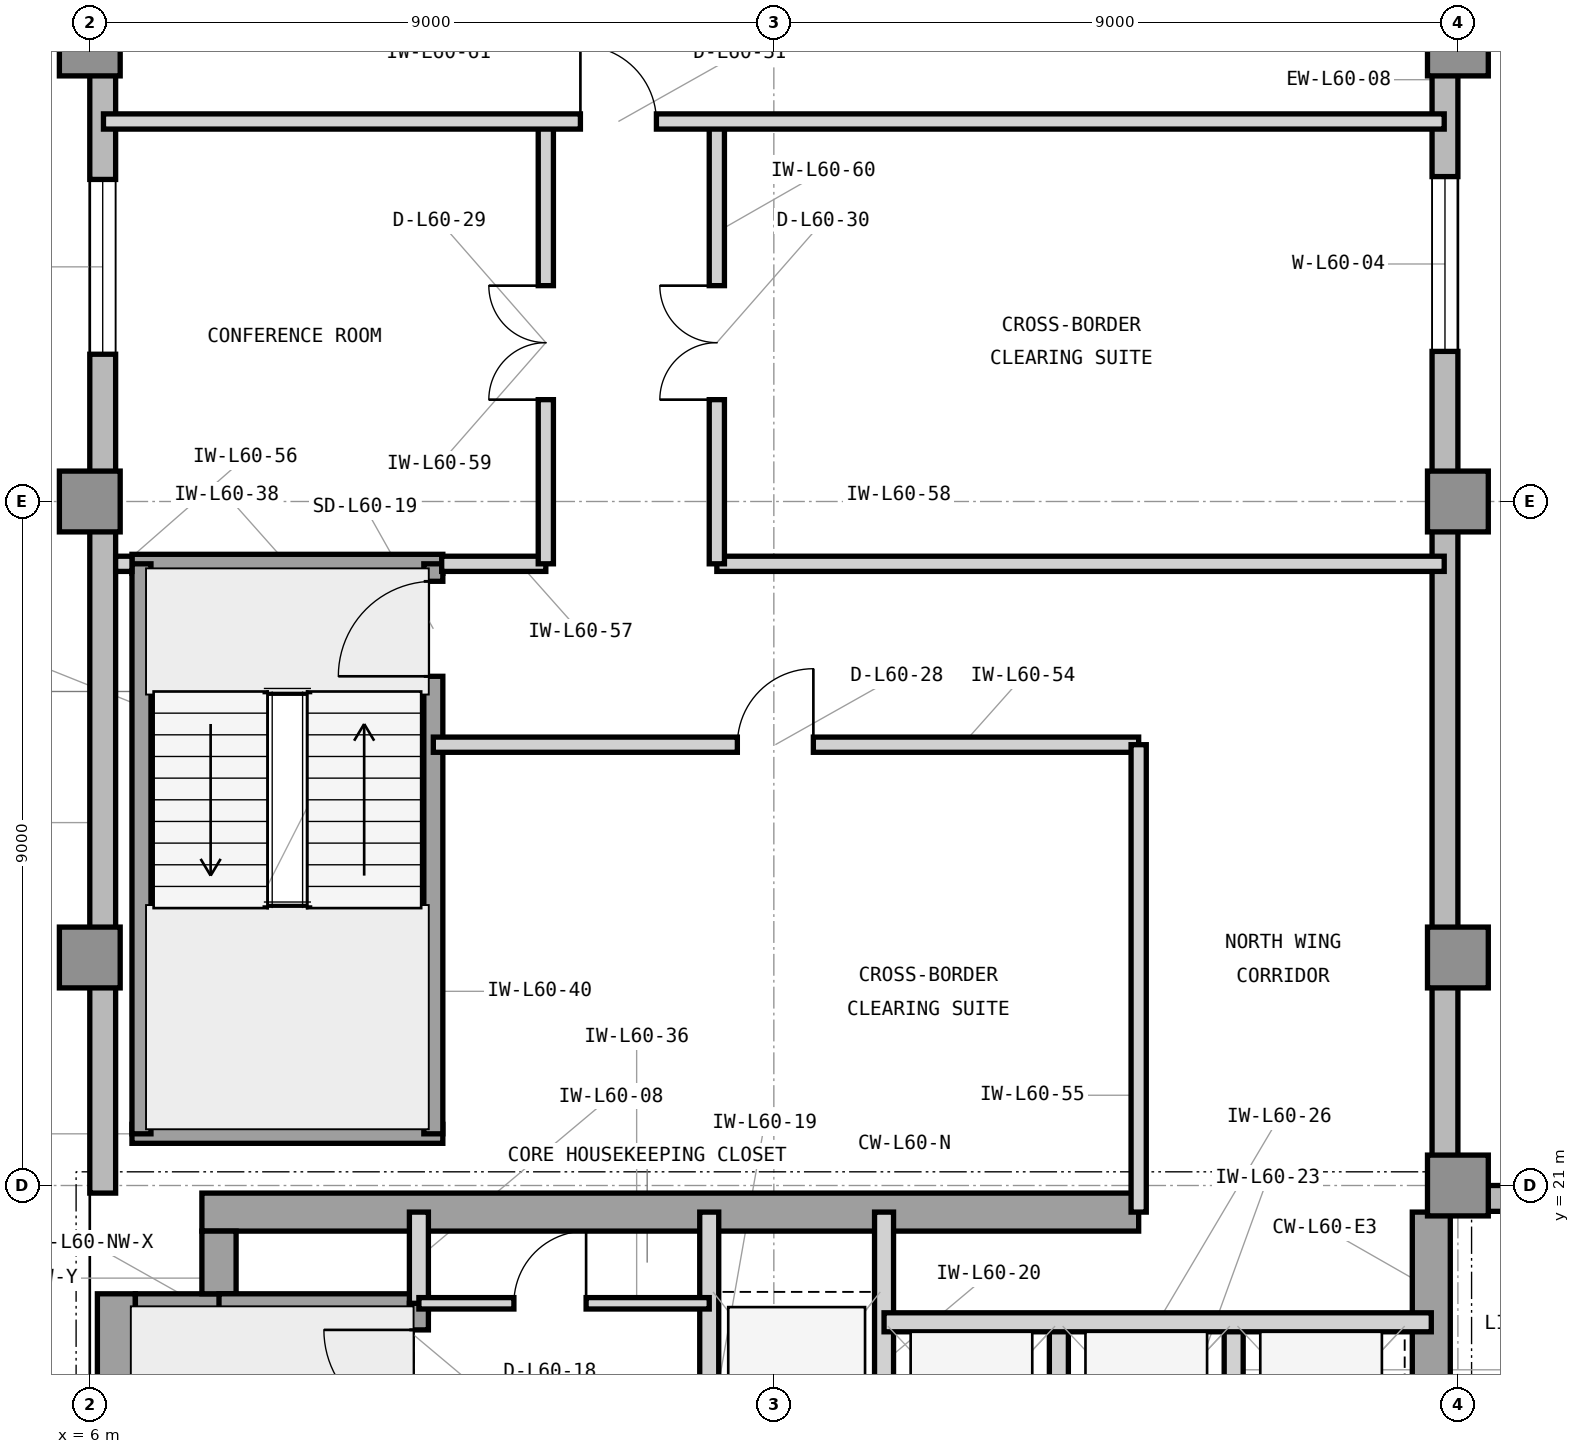
"""IFC4 building model, lengths in metres.
Left out: names, types, materials, properties, quantities, classifications, styles, units other than length and angle.
Written with IfcOpenShell. Run it as: python <this file> out.ifc"""

import sys

from ifc_helpers import new_model, si_unit, direction, frame, frame_2d, origin, origin_2d, place, context, subcontext, project, spatial, rectangle, extrude, element, fill, save


model = new_model("IFC4")
c1 = context("Model", 3, precision=1e-05, world=origin(), true_north=direction((0.0, 1.0)))
c2 = subcontext(c1, "Body", "Model", "MODEL_VIEW")
j1 = project(units=[si_unit("LENGTHUNIT", "METRE"), si_unit("PLANEANGLEUNIT", "RADIAN")], contexts=[c1])
p1 = place(None, origin())
s1 = spatial("IfcSite", under=j1, at=p1, CompositionType="ELEMENT")
p2 = place(p1, origin())
s2 = spatial("IfcBuilding", under=s1, at=p2, CompositionType="ELEMENT")
p3 = place(p2, frame((0.0, 0.0, 246.9)))
s3 = spatial("IfcBuildingStorey", under=s2, at=p3, CompositionType="ELEMENT", Elevation=246.9)
p4 = place(p3, frame((6.35, 4.425, 0.0), z_axis=(0.0, 0.0, 1.0), x_axis=(0.0, 1.0, 0.0)))
e1 = element("IfcWall", 1, at=p4, inside=s3, PredefinedType="SHEAR", context=c2, shape_type="SweptSolid", body=[
    extrude(rectangle(XDim=15.15, YDim=0.5, at=frame_2d((7.575, 0.0))), origin(), (0.0, 0.0, 1.0), 3.9),
])
p5 = place(p3, frame((7.475, 20.65, 0.0), z_axis=(0.0, 0.0, 1.0), x_axis=(1.0, 0.0, 0.0)))
e2 = element("IfcWall", 2, at=p5, inside=s3, PredefinedType="SHEAR", context=c2, shape_type="SweptSolid", body=[
    extrude(rectangle(XDim=12.325, YDim=0.5, at=frame_2d((6.163, 0.0))), origin(), (0.0, 0.0, 1.0), 3.9),
])
p6 = place(p3, frame((23.65, 16.6, 0.0), z_axis=(0.0, 0.0, 1.0), x_axis=(0.0, 1.0, 0.0)))
e3 = element("IfcWall", 3, at=p6, inside=s3, PredefinedType="SHEAR", context=c2, shape_type="SweptSolid", body=[
    extrude(rectangle(XDim=4.05, YDim=0.5, at=frame_2d((2.025, 0.0))), origin(), (0.0, 0.0, 1.0), 3.9),
])
p7 = place(p3, frame((6.6, 19.35, 0.0), z_axis=(0.0, 0.0, 1.0), x_axis=(1.0, 0.0, 0.0)))
e4 = element("IfcWall", 4, at=p7, inside=s3, PredefinedType="SHEAR", context=c2, shape_type="SweptSolid", body=[
    extrude(rectangle(XDim=1.325, YDim=0.45, at=frame_2d((0.663, 0.0))), origin(), (0.0, 0.0, 1.0), 3.9),
])
p8 = place(p3, frame((7.7, 19.575, 0.0), z_axis=(0.0, 0.0, 1.0), x_axis=(0.0, 1.0, 0.0)))
e5 = element("IfcWall", 5, at=p8, inside=s3, PredefinedType="SHEAR", context=c2, shape_type="SweptSolid", body=[
    extrude(rectangle(XDim=0.825, YDim=0.45, at=frame_2d((0.413, 0.0))), origin(), (0.0, 0.0, 1.0), 3.9),
])
for number, where, z_axis, x_axis in (
    (6, (24.0, 21.0, 0.0), (0.0, 0.0, 1.0), (1.0, 0.0, 0.0)),
    (7, (6.0, 24.0, 0.0), (0.0, 0.0, 1.0), (1.0, 0.0, 0.0)),
    (8, (24.0, 24.0, 0.0), (0.0, 0.0, 1.0), (1.0, 0.0, 0.0)),
    (9, (6.0, 30.0, 0.0), (0.0, 0.0, 1.0), (1.0, 0.0, 0.0)),
    (10, (24.0, 30.0, 0.0), (0.0, 0.0, 1.0), (1.0, 0.0, 0.0)),
    (11, (6.0, 36.0, 0.0), (0.0, 0.0, 1.0), (1.0, 0.0, 0.0)),
    (12, (24.0, 36.0, 0.0), (0.0, 0.0, 1.0), (1.0, 0.0, 0.0)),
):
    element("IfcColumn", number, at=place(p3, frame(where, z_axis=z_axis, x_axis=x_axis)), inside=s3, PredefinedType="COLUMN", context=c2, shape_type="SweptSolid", body=[
        extrude(rectangle(XDim=0.8, YDim=0.8, at=origin_2d()), origin(), (0.0, 0.0, 1.0), 3.9),
    ])
p9 = place(p3, frame((52.4, 20.83, 0.0), z_axis=(0.0, 0.0, 1.0), x_axis=(-1.0, 0.0, 0.0)))
e13 = element("IfcWall", 13, at=p9, inside=s3, PredefinedType="STANDARD", context=c2, shape_type="SweptSolid", body=[
    extrude(rectangle(XDim=28.4, YDim=0.34, at=frame_2d((14.2, 0.0))), origin(), (0.0, 0.0, 1.0), 3.7),
])
p10 = place(p9, frame((26.096, 0.0, 0.9)))
e14 = element("IfcOpeningElement", 14, at=p10, cuts=e13, PredefinedType="OPENING", context=c2, shape_type="SweptSolid", body=[
    extrude(rectangle(XDim=1.6, YDim=2.2, at=frame_2d((0.8, 1.1))), frame((0.0, 0.18, 0.0), z_axis=(0.0, -1.0, 0.0), x_axis=(1.0, 0.0, 0.0)), (0.0, 0.0, 1.0), 0.36),
])
p11 = place(p9, frame((11.375, 0.0, 0.9)))
e15 = element("IfcOpeningElement", 15, at=p11, cuts=e13, PredefinedType="OPENING", context=c2, shape_type="SweptSolid", body=[
    extrude(rectangle(XDim=2.3, YDim=2.2, at=frame_2d((1.15, 1.1))), frame((0.0, 0.18, 0.0), z_axis=(0.0, -1.0, 0.0), x_axis=(1.0, 0.0, 0.0)), (0.0, 0.0, 1.0), 0.36),
])
p12 = place(p3, frame((23.83, 21.0, 0.0), z_axis=(0.0, 0.0, 1.0), x_axis=(0.0, 1.0, 0.0)))
e16 = element("IfcWall", 16, at=p12, inside=s3, PredefinedType="STANDARD", context=c2, shape_type="SweptSolid", body=[
    extrude(rectangle(XDim=19.4, YDim=0.34, at=frame_2d((9.7, 0.0))), origin(), (0.0, 0.0, 1.0), 3.7),
])
p13 = place(p12, frame((10.975, 0.0, 0.9)))
e17 = element("IfcOpeningElement", 17, at=p13, cuts=e16, PredefinedType="OPENING", context=c2, shape_type="SweptSolid", body=[
    extrude(rectangle(XDim=2.3, YDim=2.2, at=frame_2d((1.15, 1.1))), frame((0.0, 0.18, 0.0), z_axis=(0.0, -1.0, 0.0), x_axis=(1.0, 0.0, 0.0)), (0.0, 0.0, 1.0), 0.36),
])
p14 = place(p3, frame((6.17, 40.4, 0.0), z_axis=(0.0, 0.0, 1.0), x_axis=(0.0, -1.0, 0.0)))
e18 = element("IfcWall", 18, at=p14, inside=s3, PredefinedType="STANDARD", context=c2, shape_type="SweptSolid", body=[
    extrude(rectangle(XDim=19.5, YDim=0.34, at=frame_2d((9.75, 0.0))), origin(), (0.0, 0.0, 1.0), 3.7),
])
p15 = place(p14, frame((6.163, 0.0, 0.9)))
e19 = element("IfcOpeningElement", 19, at=p15, cuts=e18, PredefinedType="OPENING", context=c2, shape_type="SweptSolid", body=[
    extrude(rectangle(XDim=2.3, YDim=2.2, at=frame_2d((1.15, 1.1))), frame((0.0, 0.18, 0.0), z_axis=(0.0, -1.0, 0.0), x_axis=(1.0, 0.0, 0.0)), (0.0, 0.0, 1.0), 0.36),
])
p16 = place(p3, frame((7.7, 19.45, 0.0), z_axis=(0.0, 0.0, 1.0), x_axis=(1.0, 0.0, 0.0)))
e20 = element("IfcWall", 20, at=p16, inside=s3, PredefinedType="SHEAR", context=c2, shape_type="SweptSolid", body=[
    extrude(rectangle(XDim=2.755, YDim=0.25, at=frame_2d((1.377, 0.0))), origin(), (0.0, 0.0, 1.0), 3.9),
])
p17 = place(p3, frame((10.33, 12.0, 0.0), z_axis=(0.0, 0.0, 1.0), x_axis=(0.0, 1.0, 0.0)))
e21 = element("IfcWall", 21, at=p17, inside=s3, PredefinedType="SHEAR", context=c2, shape_type="SweptSolid", body=[
    extrude(rectangle(XDim=7.45, YDim=0.25, at=frame_2d((3.725, 0.0))), origin(), (0.0, 0.0, 1.0), 3.9),
])
p18 = place(p17, frame((5.85, 0.0, 0.0)))
e22 = element("IfcOpeningElement", 22, at=p18, cuts=e21, PredefinedType="OPENING", context=c2, shape_type="SweptSolid", body=[
    extrude(rectangle(XDim=1.25, YDim=2.2, at=frame_2d((0.625, 1.1))), frame((0.0, 0.135, 0.0), z_axis=(0.0, -1.0, 0.0), x_axis=(1.0, 0.0, 0.0)), (0.0, 0.0, 1.0), 0.27),
])
p19 = place(p3, frame((10.33, 19.45, 0.0), z_axis=(0.0, 0.0, 1.0), x_axis=(0.0, 1.0, 0.0)))
e23 = element("IfcWall", 23, at=p19, inside=s3, PredefinedType="PARTITIONING", context=c2, shape_type="SweptSolid", body=[
    extrude(rectangle(XDim=1.2, YDim=0.25, at=frame_2d((0.6, 0.0))), origin(), (0.0, 0.0, 1.0), 3.69),
])
for number, where, z_axis, x_axis in (
    (24, (14.15, 16.7, 0.0), (0.0, 0.0, 1.0), (0.0, 1.0, 0.0)),
    (25, (16.45, 16.7, 0.0), (0.0, 0.0, 1.0), (0.0, 1.0, 0.0)),
):
    element("IfcWall", number, at=place(p3, frame(where, z_axis=z_axis, x_axis=x_axis)), inside=s3, PredefinedType="PARTITIONING", context=c2, shape_type="SweptSolid", body=[
        extrude(rectangle(XDim=3.95, YDim=0.25, at=frame_2d((1.975, 0.0))), origin(), (0.0, 0.0, 1.0), 3.69),
    ])
for number, where, z_axis, x_axis in (
    (26, (18.75, 16.7, 0.0), (0.0, 0.0, 1.0), (0.0, 1.0, 0.0)),
    (27, (21.05, 16.7, 0.0), (0.0, 0.0, 1.0), (0.0, 1.0, 0.0)),
):
    element("IfcWall", number, at=place(p3, frame(where, z_axis=z_axis, x_axis=x_axis)), inside=s3, PredefinedType="PARTITIONING", context=c2, shape_type="SweptSolid", body=[
        extrude(rectangle(XDim=2.5, YDim=0.25, at=frame_2d((1.25, 0.0))), origin(), (0.0, 0.0, 1.0), 3.69),
    ])
p20 = place(p3, frame((16.45, 19.2, 0.0), z_axis=(0.0, 0.0, 1.0), x_axis=(1.0, 0.0, 0.0)))
e28 = element("IfcWall", 28, at=p20, inside=s3, PredefinedType="PARTITIONING", context=c2, shape_type="SweptSolid", body=[
    extrude(rectangle(XDim=7.2, YDim=0.25, at=frame_2d((3.6, 0.0))), origin(), (0.0, 0.0, 1.0), 3.69),
])
p21 = place(p3, frame((10.33, 19.45, 0.0), z_axis=(0.0, 0.0, 1.0), x_axis=(1.0, 0.0, 0.0)))
e29 = element("IfcWall", 29, at=p21, inside=s3, PredefinedType="PARTITIONING", context=c2, shape_type="SweptSolid", body=[
    extrude(rectangle(XDim=3.82, YDim=0.15, at=frame_2d((1.91, 0.0))), origin(), (0.0, 0.0, 1.0), 3.69),
])
p22 = place(p21, frame((1.25, 0.0, 0.0)))
e30 = element("IfcOpeningElement", 30, at=p22, cuts=e29, PredefinedType="OPENING", context=c2, shape_type="SweptSolid", body=[
    extrude(rectangle(XDim=0.95, YDim=2.1, at=frame_2d((0.475, 1.05))), frame((0.0, 0.085, 0.0), z_axis=(0.0, -1.0, 0.0), x_axis=(1.0, 0.0, 0.0)), (0.0, 0.0, 1.0), 0.17),
])
for number, where, z_axis, x_axis in (
    (31, (6.555, 21.68, 0.0), (0.0, 0.0, 1.0), (1.0, 0.0, 0.0)),
    (32, (6.555, 29.18, 0.0), (0.0, 0.0, 1.0), (1.0, 0.0, 0.0)),
):
    element("IfcWall", number, at=place(p3, frame(where, z_axis=z_axis, x_axis=x_axis)), inside=s3, PredefinedType="SHEAR", context=c2, shape_type="SweptSolid", body=[
        extrude(rectangle(XDim=4.09, YDim=0.25, at=frame_2d((2.045, 0.0))), origin(), (0.0, 0.0, 1.0), 3.9),
    ])
p23 = place(p3, frame((6.68, 21.68, 0.0), z_axis=(0.0, 0.0, 1.0), x_axis=(0.0, 1.0, 0.0)))
e33 = element("IfcWall", 33, at=p23, inside=s3, PredefinedType="SHEAR", context=c2, shape_type="SweptSolid", body=[
    extrude(rectangle(XDim=7.5, YDim=0.25, at=frame_2d((3.75, 0.0))), origin(), (0.0, 0.0, 1.0), 3.9),
])
p24 = place(p3, frame((10.52, 21.68, 0.0), z_axis=(0.0, 0.0, 1.0), x_axis=(0.0, 1.0, 0.0)))
e34 = element("IfcWall", 34, at=p24, inside=s3, PredefinedType="SHEAR", context=c2, shape_type="SweptSolid", body=[
    extrude(rectangle(XDim=7.5, YDim=0.25, at=frame_2d((3.75, 0.0))), origin(), (0.0, 0.0, 1.0), 3.9),
])
p25 = place(p24, frame((6.02, 0.0, 0.0)))
e35 = element("IfcOpeningElement", 35, at=p25, cuts=e34, PredefinedType="OPENING", context=c2, shape_type="SweptSolid", body=[
    extrude(rectangle(XDim=1.25, YDim=2.2, at=frame_2d((0.625, 1.1))), frame((0.0, 0.135, 0.0), z_axis=(0.0, -1.0, 0.0), x_axis=(1.0, 0.0, 0.0)), (0.0, 0.0, 1.0), 0.27),
])
p26 = place(p3, frame((10.52, 26.8, 0.0), z_axis=(0.0, 0.0, 1.0), x_axis=(1.0, 0.0, 0.0)))
e36 = element("IfcWall", 36, at=p26, inside=s3, PredefinedType="PARTITIONING", context=c2, shape_type="SweptSolid", body=[
    extrude(rectangle(XDim=9.28, YDim=0.2, at=frame_2d((4.64, 0.0))), origin(), (0.0, 0.0, 1.0), 3.69),
])
p27 = place(p26, frame((4.0, 0.0, 0.0)))
e37 = element("IfcOpeningElement", 37, at=p27, cuts=e36, PredefinedType="OPENING", context=c2, shape_type="SweptSolid", body=[
    extrude(rectangle(XDim=1.0, YDim=2.15, at=frame_2d((0.5, 1.075))), frame((0.0, 0.11, 0.0), z_axis=(0.0, -1.0, 0.0), x_axis=(1.0, 0.0, 0.0)), (0.0, 0.0, 1.0), 0.22),
])
p28 = place(p3, frame((19.8, 20.65, 0.0), z_axis=(0.0, 0.0, 1.0), x_axis=(0.0, 1.0, 0.0)))
e38 = element("IfcWall", 38, at=p28, inside=s3, PredefinedType="PARTITIONING", context=c2, shape_type="SweptSolid", body=[
    extrude(rectangle(XDim=6.15, YDim=0.2, at=frame_2d((3.075, 0.0))), origin(), (0.0, 0.0, 1.0), 3.69),
])
p29 = place(p3, frame((6.34, 29.18, 0.0), z_axis=(0.0, 0.0, 1.0), x_axis=(1.0, 0.0, 0.0)))
e39 = element("IfcWall", 39, at=p29, inside=s3, PredefinedType="PARTITIONING", context=c2, shape_type="SweptSolid", body=[
    extrude(rectangle(XDim=0.215, YDim=0.2, at=frame_2d((0.107, 0.0))), origin(), (0.0, 0.0, 1.0), 3.69),
])
p30 = place(p3, frame((10.63, 29.18, 0.0), z_axis=(0.0, 0.0, 1.0), x_axis=(1.0, 0.0, 0.0)))
e40 = element("IfcWall", 40, at=p30, inside=s3, PredefinedType="PARTITIONING", context=c2, shape_type="SweptSolid", body=[
    extrude(rectangle(XDim=1.37, YDim=0.2, at=frame_2d((0.685, 0.0))), origin(), (0.0, 0.0, 1.0), 3.69),
])
p31 = place(p3, frame((14.25, 29.18, 0.0), z_axis=(0.0, 0.0, 1.0), x_axis=(1.0, 0.0, 0.0)))
e41 = element("IfcWall", 41, at=p31, inside=s3, PredefinedType="PARTITIONING", context=c2, shape_type="SweptSolid", body=[
    extrude(rectangle(XDim=9.57, YDim=0.2, at=frame_2d((4.785, 0.0))), origin(), (0.0, 0.0, 1.0), 3.69),
])
p32 = place(p3, frame((12.0, 29.18, 0.0), z_axis=(0.0, 0.0, 1.0), x_axis=(0.0, 1.0, 0.0)))
e42 = element("IfcWall", 42, at=p32, inside=s3, PredefinedType="PARTITIONING", context=c2, shape_type="SweptSolid", body=[
    extrude(rectangle(XDim=5.82, YDim=0.2, at=frame_2d((2.91, 0.0))), origin(), (0.0, 0.0, 1.0), 3.286),
])
p33 = place(p32, frame((2.16, 0.0, 0.0)))
e43 = element("IfcOpeningElement", 43, at=p33, cuts=e42, PredefinedType="OPENING", context=c2, shape_type="SweptSolid", body=[
    extrude(rectangle(XDim=1.5, YDim=2.3, at=frame_2d((0.75, 1.15))), frame((0.0, 0.11, 0.0), z_axis=(0.0, -1.0, 0.0), x_axis=(1.0, 0.0, 0.0)), (0.0, 0.0, 1.0), 0.22),
])
p34 = place(p3, frame((14.25, 29.18, 0.0), z_axis=(0.0, 0.0, 1.0), x_axis=(0.0, 1.0, 0.0)))
e44 = element("IfcWall", 44, at=p34, inside=s3, PredefinedType="PARTITIONING", context=c2, shape_type="SweptSolid", body=[
    extrude(rectangle(XDim=5.82, YDim=0.2, at=frame_2d((2.91, 0.0))), origin(), (0.0, 0.0, 1.0), 3.69),
])
p35 = place(p34, frame((2.16, 0.0, 0.0)))
e45 = element("IfcOpeningElement", 45, at=p35, cuts=e44, PredefinedType="OPENING", context=c2, shape_type="SweptSolid", body=[
    extrude(rectangle(XDim=1.5, YDim=2.3, at=frame_2d((0.75, 1.15))), frame((0.0, 0.11, 0.0), z_axis=(0.0, -1.0, 0.0), x_axis=(1.0, 0.0, 0.0)), (0.0, 0.0, 1.0), 0.22),
])
p36 = place(p3, frame((6.18, 35.0, 0.0), z_axis=(0.0, 0.0, 1.0), x_axis=(1.0, 0.0, 0.0)))
e46 = element("IfcWall", 46, at=p36, inside=s3, PredefinedType="PARTITIONING", context=c2, shape_type="SweptSolid", body=[
    extrude(rectangle(XDim=17.64, YDim=0.2, at=frame_2d((8.82, 0.0))), origin(), (0.0, 0.0, 1.0), 3.69),
])
p37 = place(p36, frame((6.275, 0.0, 0.0)))
e47 = element("IfcOpeningElement", 47, at=p37, cuts=e46, PredefinedType="OPENING", context=c2, shape_type="SweptSolid", body=[
    extrude(rectangle(XDim=1.0, YDim=2.15, at=frame_2d((0.5, 1.075))), frame((0.0, 0.11, 0.0), z_axis=(0.0, -1.0, 0.0), x_axis=(1.0, 0.0, 0.0)), (0.0, 0.0, 1.0), 0.22),
])
p38 = place(p13, origin())
e48 = element("IfcWindow", 48, at=p38, inside=s3, PartitioningType="SINGLE_PANEL", PredefinedType="WINDOW", context=c2, shape_type="SweptSolid", body=[
    extrude(rectangle(XDim=2.3, YDim=2.2, at=frame_2d((1.15, 1.1))), frame((0.0, 0.11, 0.0), z_axis=(0.0, -1.0, 0.0), x_axis=(1.0, 0.0, 0.0)), (0.0, 0.0, 1.0), 0.06),
])
fill(e17, e48)
p39 = place(p15, origin())
e49 = element("IfcWindow", 49, at=p39, inside=s3, PartitioningType="SINGLE_PANEL", PredefinedType="WINDOW", context=c2, shape_type="SweptSolid", body=[
    extrude(rectangle(XDim=2.3, YDim=2.2, at=frame_2d((1.15, 1.1))), frame((0.0, 0.11, 0.0), z_axis=(0.0, -1.0, 0.0), x_axis=(1.0, 0.0, 0.0)), (0.0, 0.0, 1.0), 0.06),
])
fill(e19, e49)
p40 = place(p18, origin())
e50 = element("IfcDoor", 50, at=p40, inside=s3, OperationType="SINGLE_SWING_RIGHT", PredefinedType="DOOR", context=c2, shape_type="SweptSolid", body=[
    extrude(rectangle(XDim=1.25, YDim=2.2, at=frame_2d((0.625, 1.1))), frame((0.0, 0.025, 0.0), z_axis=(0.0, -1.0, 0.0), x_axis=(1.0, 0.0, 0.0)), (0.0, 0.0, 1.0), 0.05),
])
fill(e22, e50)
p41 = place(p22, origin())
e51 = element("IfcDoor", 51, at=p41, inside=s3, OperationType="SINGLE_SWING_RIGHT", PredefinedType="DOOR", context=c2, shape_type="SweptSolid", body=[
    extrude(rectangle(XDim=0.95, YDim=2.1, at=frame_2d((0.475, 1.05))), frame((0.0, 0.025, 0.0), z_axis=(0.0, -1.0, 0.0), x_axis=(1.0, 0.0, 0.0)), (0.0, 0.0, 1.0), 0.05),
])
fill(e30, e51)
p42 = place(p25, origin())
e52 = element("IfcDoor", 52, at=p42, inside=s3, OperationType="SINGLE_SWING_LEFT", PredefinedType="DOOR", context=c2, shape_type="SweptSolid", body=[
    extrude(rectangle(XDim=1.25, YDim=2.2, at=frame_2d((0.625, 1.1))), frame((0.0, 0.025, 0.0), z_axis=(0.0, -1.0, 0.0), x_axis=(1.0, 0.0, 0.0)), (0.0, 0.0, 1.0), 0.05),
])
fill(e35, e52)
p43 = place(p27, origin())
e53 = element("IfcDoor", 53, at=p43, inside=s3, OperationType="SINGLE_SWING_RIGHT", PredefinedType="DOOR", context=c2, shape_type="SweptSolid", body=[
    extrude(rectangle(XDim=1.0, YDim=2.15, at=frame_2d((0.5, 1.075))), frame((0.0, 0.025, 0.0), z_axis=(0.0, -1.0, 0.0), x_axis=(1.0, 0.0, 0.0)), (0.0, 0.0, 1.0), 0.05),
])
fill(e37, e53)
p44 = place(p33, origin())
e54 = element("IfcDoor", 54, at=p44, inside=s3, OperationType="DOUBLE_DOOR_SINGLE_SWING", PredefinedType="DOOR", context=c2, shape_type="SweptSolid", body=[
    extrude(rectangle(XDim=1.5, YDim=2.3, at=frame_2d((0.75, 1.15))), frame((0.0, 0.025, 0.0), z_axis=(0.0, -1.0, 0.0), x_axis=(1.0, 0.0, 0.0)), (0.0, 0.0, 1.0), 0.05),
])
fill(e43, e54)
p45 = place(p35, origin())
e55 = element("IfcDoor", 55, at=p45, inside=s3, OperationType="DOUBLE_DOOR_SINGLE_SWING", PredefinedType="DOOR", context=c2, shape_type="SweptSolid", body=[
    extrude(rectangle(XDim=1.5, YDim=2.3, at=frame_2d((0.75, 1.15))), frame((0.0, 0.025, 0.0), z_axis=(0.0, -1.0, 0.0), x_axis=(1.0, 0.0, 0.0)), (0.0, 0.0, 1.0), 0.05),
])
fill(e45, e55)
p46 = place(p37, origin())
e56 = element("IfcDoor", 56, at=p46, inside=s3, OperationType="SINGLE_SWING_LEFT", PredefinedType="DOOR", context=c2, shape_type="SweptSolid", body=[
    extrude(rectangle(XDim=1.0, YDim=2.15, at=frame_2d((0.5, 1.075))), frame((0.0, 0.025, 0.0), z_axis=(0.0, -1.0, 0.0), x_axis=(1.0, 0.0, 0.0)), (0.0, 0.0, 1.0), 0.05),
])
fill(e47, e56)
save(model, sys.argv[1])
